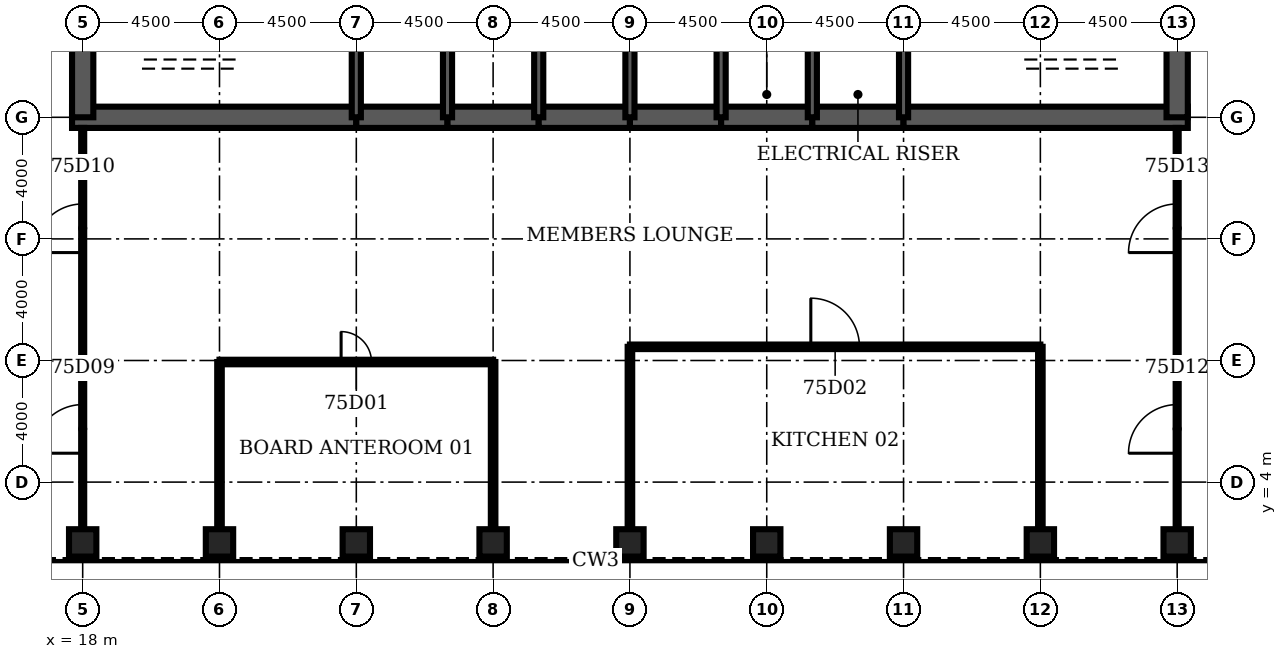
"""IFC4 building model, lengths in metres.
Left out: names, types, materials, properties, quantities, classifications, styles, units other than length and angle.
Written with IfcOpenShell. Run it as: python <this file> out.ifc"""

import sys

from ifc_helpers import new_model, si_unit, direction, frame, frame_2d, origin, origin_2d, place, context, subcontext, project, spatial, rectangle, hollow_rectangle, extrude, element, fill, save


model = new_model("IFC4")
c1 = context("Model", 3, precision=1e-05, world=origin(), true_north=direction((0.0, 1.0)))
c2 = subcontext(c1, "Body", "Model", "MODEL_VIEW")
j1 = project(units=[si_unit("LENGTHUNIT", "METRE"), si_unit("PLANEANGLEUNIT", "RADIAN")], contexts=[c1])
p1 = place(None, origin())
s1 = spatial("IfcSite", under=j1, at=p1, CompositionType="ELEMENT")
p2 = place(p1, origin())
s2 = spatial("IfcBuilding", under=s1, at=p2, CompositionType="ELEMENT")
p3 = place(p2, frame((0.0, 0.0, 329.9)))
s3 = spatial("IfcBuildingStorey", under=s2, at=p3, CompositionType="ELEMENT", Elevation=329.9)
for number, where, z_axis, x_axis in (
    (1, (18.0, 2.0, 0.0), (0.0, 0.0, 1.0), (0.0, 1.0, 0.0)),
    (2, (22.5, 2.0, 0.0), (0.0, 0.0, 1.0), (0.0, 1.0, 0.0)),
    (3, (27.0, 2.0, 0.0), (0.0, 0.0, 1.0), (0.0, 1.0, 0.0)),
    (4, (31.5, 2.0, 0.0), (0.0, 0.0, 1.0), (0.0, 1.0, 0.0)),
    (5, (36.0, 2.0, 0.0), (0.0, 0.0, 1.0), (0.0, 1.0, 0.0)),
    (6, (40.5, 2.0, 0.0), (0.0, 0.0, 1.0), (0.0, 1.0, 0.0)),
    (7, (45.0, 2.0, 0.0), (0.0, 0.0, 1.0), (0.0, 1.0, 0.0)),
    (8, (49.5, 2.0, 0.0), (0.0, 0.0, 1.0), (0.0, 1.0, 0.0)),
    (9, (54.0, 2.0, 0.0), (0.0, 0.0, 1.0), (0.0, 1.0, 0.0)),
):
    element("IfcColumn", number, at=place(p3, frame(where, z_axis=z_axis, x_axis=x_axis)), inside=s3, PredefinedType="COLUMN", context=c2, shape_type="SweptSolid", body=[
        extrude(hollow_rectangle(XDim=0.9, YDim=0.9, WallThickness=0.05, at=origin_2d()), origin(), (0.0, 0.0, 1.0), 4.2),
    ])
p4 = place(p3, frame((17.65, 16.0, 0.0), z_axis=(0.0, 0.0, 1.0), x_axis=(1.0, 0.0, 0.0)))
e10 = element("IfcWall", 10, at=p4, inside=s3, PredefinedType="SHEAR", context=c2, shape_type="SweptSolid", body=[
    extrude(rectangle(XDim=9.35, YDim=0.7, at=frame_2d((4.675, 0.0))), origin(), (0.0, 0.0, 1.0), 4.2),
])
for number, where, z_axis, x_axis in (
    (11, (27.0, 16.0, 0.0), (0.0, 0.0, 1.0), (1.0, 0.0, 0.0)),
    (12, (30.0, 16.0, 0.0), (0.0, 0.0, 1.0), (1.0, 0.0, 0.0)),
    (13, (33.0, 16.0, 0.0), (0.0, 0.0, 1.0), (1.0, 0.0, 0.0)),
    (14, (36.0, 16.0, 0.0), (0.0, 0.0, 1.0), (1.0, 0.0, 0.0)),
    (15, (39.0, 16.0, 0.0), (0.0, 0.0, 1.0), (1.0, 0.0, 0.0)),
    (16, (42.0, 16.0, 0.0), (0.0, 0.0, 1.0), (1.0, 0.0, 0.0)),
):
    element("IfcWall", number, at=place(p3, frame(where, z_axis=z_axis, x_axis=x_axis)), inside=s3, PredefinedType="SHEAR", context=c2, shape_type="SweptSolid", body=[
        extrude(rectangle(XDim=3.0, YDim=0.7, at=frame_2d((1.5, 0.0))), origin(), (0.0, 0.0, 1.0), 4.2),
    ])
p5 = place(p3, frame((45.0, 16.0, 0.0), z_axis=(0.0, 0.0, 1.0), x_axis=(1.0, 0.0, 0.0)))
e17 = element("IfcWall", 17, at=p5, inside=s3, PredefinedType="SHEAR", context=c2, shape_type="SweptSolid", body=[
    extrude(rectangle(XDim=9.35, YDim=0.7, at=frame_2d((4.675, 0.0))), origin(), (0.0, 0.0, 1.0), 4.2),
])
for number, where, z_axis, x_axis in (
    (18, (18.0, 19.2, 0.0), (0.0, 0.0, 1.0), (0.0, -1.0, 0.0)),
    (19, (54.0, 16.0, 0.0), (0.0, 0.0, 1.0), (0.0, 1.0, 0.0)),
):
    element("IfcWall", number, at=place(p3, frame(where, z_axis=z_axis, x_axis=x_axis)), inside=s3, PredefinedType="SHEAR", context=c2, shape_type="SweptSolid", body=[
        extrude(rectangle(XDim=3.2, YDim=0.7, at=frame_2d((1.6, 0.0))), origin(), (0.0, 0.0, 1.0), 4.2),
    ])
for number, where, z_axis, x_axis in (
    (20, (27.0, 16.0, 0.0), (0.0, 0.0, 1.0), (0.0, 1.0, 0.0)),
    (21, (30.0, 16.0, 0.0), (0.0, 0.0, 1.0), (0.0, 1.0, 0.0)),
    (22, (33.0, 16.0, 0.0), (0.0, 0.0, 1.0), (0.0, 1.0, 0.0)),
    (23, (36.0, 16.0, 0.0), (0.0, 0.0, 1.0), (0.0, 1.0, 0.0)),
    (24, (39.0, 16.0, 0.0), (0.0, 0.0, 1.0), (0.0, 1.0, 0.0)),
    (25, (42.0, 16.0, 0.0), (0.0, 0.0, 1.0), (0.0, 1.0, 0.0)),
    (26, (45.0, 16.0, 0.0), (0.0, 0.0, 1.0), (0.0, 1.0, 0.0)),
):
    element("IfcWall", number, at=place(p3, frame(where, z_axis=z_axis, x_axis=x_axis)), inside=s3, PredefinedType="SOLIDWALL", context=c2, shape_type="SweptSolid", body=[
        extrude(rectangle(XDim=3.2, YDim=0.3, at=frame_2d((1.6, 0.0))), origin(), (0.0, 0.0, 1.0), 4.2),
    ])
p6 = place(p3, frame((39.15, 17.3, 0.0), z_axis=(0.0, 0.0, 1.0), x_axis=(1.0, 0.0, 0.0)))
e27 = element("IfcWall", 27, at=p6, inside=s3, PredefinedType="SOLIDWALL", context=c2, shape_type="SweptSolid", body=[
    extrude(rectangle(XDim=2.7, YDim=0.3, at=frame_2d((1.35, 0.0))), origin(), (0.0, 0.0, 1.0), 3.95),
])
p7 = place(p6, frame((0.85, 0.0, 0.0)))
e28 = element("IfcOpeningElement", 28, at=p7, cuts=e27, PredefinedType="OPENING", context=c2, shape_type="SweptSolid", body=[
    extrude(rectangle(XDim=1.0, YDim=2.1, at=frame_2d((0.5, 1.05))), frame((0.0, 0.16, 0.0), z_axis=(0.0, -1.0, 0.0), x_axis=(1.0, 0.0, 0.0)), (0.0, 0.0, 1.0), 0.32),
])
p8 = place(p3, frame((42.15, 17.3, 0.0), z_axis=(0.0, 0.0, 1.0), x_axis=(1.0, 0.0, 0.0)))
e29 = element("IfcWall", 29, at=p8, inside=s3, PredefinedType="SOLIDWALL", context=c2, shape_type="SweptSolid", body=[
    extrude(rectangle(XDim=2.7, YDim=0.3, at=frame_2d((1.35, 0.0))), origin(), (0.0, 0.0, 1.0), 3.95),
])
p9 = place(p8, frame((0.85, 0.0, 0.0)))
e30 = element("IfcOpeningElement", 30, at=p9, cuts=e29, PredefinedType="OPENING", context=c2, shape_type="SweptSolid", body=[
    extrude(rectangle(XDim=1.0, YDim=2.1, at=frame_2d((0.5, 1.05))), frame((0.0, 0.16, 0.0), z_axis=(0.0, -1.0, 0.0), x_axis=(1.0, 0.0, 0.0)), (0.0, 0.0, 1.0), 0.32),
])
p10 = place(p3, frame((22.5, 7.95, 0.0), z_axis=(0.0, 0.0, 1.0), x_axis=(1.0, 0.0, 0.0)))
e31 = element("IfcWall", 31, at=p10, inside=s3, PredefinedType="PARTITIONING", context=c2, shape_type="SweptSolid", body=[
    extrude(rectangle(XDim=9.0, YDim=0.15, at=frame_2d((4.5, 0.0))), origin(), (0.0, 0.0, 1.0), 3.0),
])
p11 = place(p10, frame((4.0, 0.0, 0.0)))
e32 = element("IfcOpeningElement", 32, at=p11, cuts=e31, PredefinedType="OPENING", context=c2, shape_type="SweptSolid", body=[
    extrude(rectangle(XDim=1.0, YDim=2.1, at=frame_2d((0.5, 1.05))), frame((0.0, 0.085, 0.0), z_axis=(0.0, -1.0, 0.0), x_axis=(1.0, 0.0, 0.0)), (0.0, 0.0, 1.0), 0.17),
])
p12 = place(p3, frame((36.0, 8.45, 0.0), z_axis=(0.0, 0.0, 1.0), x_axis=(1.0, 0.0, 0.0)))
e33 = element("IfcWall", 33, at=p12, inside=s3, PredefinedType="PARTITIONING", context=c2, shape_type="SweptSolid", body=[
    extrude(rectangle(XDim=13.5, YDim=0.15, at=frame_2d((6.75, 0.0))), origin(), (0.0, 0.0, 1.0), 3.0),
])
p13 = place(p12, frame((5.95, 0.0, 0.0)))
e34 = element("IfcOpeningElement", 34, at=p13, cuts=e33, PredefinedType="OPENING", context=c2, shape_type="SweptSolid", body=[
    extrude(rectangle(XDim=1.6, YDim=2.1, at=frame_2d((0.8, 1.05))), frame((0.0, 0.085, 0.0), z_axis=(0.0, -1.0, 0.0), x_axis=(1.0, 0.0, 0.0)), (0.0, 0.0, 1.0), 0.17),
])
p14 = place(p3, frame((18.0, 2.45, 0.0), z_axis=(0.0, 0.0, 1.0), x_axis=(0.0, 1.0, 0.0)))
e35 = element("IfcWall", 35, at=p14, inside=s3, PredefinedType="PARTITIONING", context=c2, shape_type="SweptSolid", body=[
    extrude(rectangle(XDim=13.2, YDim=0.1, at=frame_2d((6.6, 0.0))), origin(), (0.0, 0.0, 1.0), 3.0),
])
p15 = place(p14, frame((2.5, 0.0, 0.0)))
e36 = element("IfcOpeningElement", 36, at=p15, cuts=e35, PredefinedType="OPENING", context=c2, shape_type="SweptSolid", body=[
    extrude(rectangle(XDim=1.6, YDim=2.1, at=frame_2d((0.8, 1.05))), frame((0.0, 0.06, 0.0), z_axis=(0.0, -1.0, 0.0), x_axis=(1.0, 0.0, 0.0)), (0.0, 0.0, 1.0), 0.12),
])
p16 = place(p14, frame((9.1, 0.0, 0.0)))
e37 = element("IfcOpeningElement", 37, at=p16, cuts=e35, PredefinedType="OPENING", context=c2, shape_type="SweptSolid", body=[
    extrude(rectangle(XDim=1.6, YDim=2.1, at=frame_2d((0.8, 1.05))), frame((0.0, 0.06, 0.0), z_axis=(0.0, -1.0, 0.0), x_axis=(1.0, 0.0, 0.0)), (0.0, 0.0, 1.0), 0.12),
])
for number, where, z_axis, x_axis in (
    (38, (22.5, 2.45, 0.0), (0.0, 0.0, 1.0), (0.0, 1.0, 0.0)),
    (39, (31.5, 2.45, 0.0), (0.0, 0.0, 1.0), (0.0, 1.0, 0.0)),
):
    element("IfcWall", number, at=place(p3, frame(where, z_axis=z_axis, x_axis=x_axis)), inside=s3, PredefinedType="PARTITIONING", context=c2, shape_type="SweptSolid", body=[
        extrude(rectangle(XDim=5.5, YDim=0.15, at=frame_2d((2.75, 0.0))), origin(), (0.0, 0.0, 1.0), 3.0),
    ])
for number, where, z_axis, x_axis in (
    (40, (36.0, 2.45, 0.0), (0.0, 0.0, 1.0), (0.0, 1.0, 0.0)),
    (41, (49.5, 2.45, 0.0), (0.0, 0.0, 1.0), (0.0, 1.0, 0.0)),
):
    element("IfcWall", number, at=place(p3, frame(where, z_axis=z_axis, x_axis=x_axis)), inside=s3, PredefinedType="PARTITIONING", context=c2, shape_type="SweptSolid", body=[
        extrude(rectangle(XDim=6.0, YDim=0.15, at=frame_2d((3.0, 0.0))), origin(), (0.0, 0.0, 1.0), 3.0),
    ])
p17 = place(p3, frame((54.0, 2.45, 0.0), z_axis=(0.0, 0.0, 1.0), x_axis=(0.0, 1.0, 0.0)))
e42 = element("IfcWall", 42, at=p17, inside=s3, PredefinedType="PARTITIONING", context=c2, shape_type="SweptSolid", body=[
    extrude(rectangle(XDim=13.2, YDim=0.1, at=frame_2d((6.6, 0.0))), origin(), (0.0, 0.0, 1.0), 3.0),
])
p18 = place(p17, frame((2.5, 0.0, 0.0)))
e43 = element("IfcOpeningElement", 43, at=p18, cuts=e42, PredefinedType="OPENING", context=c2, shape_type="SweptSolid", body=[
    extrude(rectangle(XDim=1.6, YDim=2.1, at=frame_2d((0.8, 1.05))), frame((0.0, 0.06, 0.0), z_axis=(0.0, -1.0, 0.0), x_axis=(1.0, 0.0, 0.0)), (0.0, 0.0, 1.0), 0.12),
])
p19 = place(p17, frame((9.1, 0.0, 0.0)))
e44 = element("IfcOpeningElement", 44, at=p19, cuts=e42, PredefinedType="OPENING", context=c2, shape_type="SweptSolid", body=[
    extrude(rectangle(XDim=1.6, YDim=2.1, at=frame_2d((0.8, 1.05))), frame((0.0, 0.06, 0.0), z_axis=(0.0, -1.0, 0.0), x_axis=(1.0, 0.0, 0.0)), (0.0, 0.0, 1.0), 0.12),
])
p20 = place(p7, origin())
e45 = element("IfcDoor", 45, at=p20, inside=s3, OperationType="SINGLE_SWING_LEFT", PredefinedType="DOOR", context=c2, shape_type="SweptSolid", body=[
    extrude(rectangle(XDim=1.0, YDim=2.1, at=frame_2d((0.5, 1.05))), frame((0.0, 0.025, 0.0), z_axis=(0.0, -1.0, 0.0), x_axis=(1.0, 0.0, 0.0)), (0.0, 0.0, 1.0), 0.05),
])
fill(e28, e45)
p21 = place(p9, origin())
e46 = element("IfcDoor", 46, at=p21, inside=s3, OperationType="SINGLE_SWING_LEFT", PredefinedType="DOOR", context=c2, shape_type="SweptSolid", body=[
    extrude(rectangle(XDim=1.0, YDim=2.1, at=frame_2d((0.5, 1.05))), frame((0.0, 0.025, 0.0), z_axis=(0.0, -1.0, 0.0), x_axis=(1.0, 0.0, 0.0)), (0.0, 0.0, 1.0), 0.05),
])
fill(e30, e46)
p22 = place(p11, origin())
e47 = element("IfcDoor", 47, at=p22, inside=s3, OperationType="SINGLE_SWING_LEFT", PredefinedType="DOOR", context=c2, shape_type="SweptSolid", body=[
    extrude(rectangle(XDim=1.0, YDim=2.1, at=frame_2d((0.5, 1.05))), frame((0.0, 0.025, 0.0), z_axis=(0.0, -1.0, 0.0), x_axis=(1.0, 0.0, 0.0)), (0.0, 0.0, 1.0), 0.05),
])
fill(e32, e47)
p23 = place(p13, origin())
e48 = element("IfcDoor", 48, at=p23, inside=s3, OperationType="SINGLE_SWING_LEFT", PredefinedType="DOOR", context=c2, shape_type="SweptSolid", body=[
    extrude(rectangle(XDim=1.6, YDim=2.1, at=frame_2d((0.8, 1.05))), frame((0.0, 0.025, 0.0), z_axis=(0.0, -1.0, 0.0), x_axis=(1.0, 0.0, 0.0)), (0.0, 0.0, 1.0), 0.05),
])
fill(e34, e48)
p24 = place(p15, origin())
e49 = element("IfcDoor", 49, at=p24, inside=s3, OperationType="SINGLE_SWING_LEFT", PredefinedType="DOOR", context=c2, shape_type="SweptSolid", body=[
    extrude(rectangle(XDim=1.6, YDim=2.1, at=frame_2d((0.8, 1.05))), frame((0.0, 0.025, 0.0), z_axis=(0.0, -1.0, 0.0), x_axis=(1.0, 0.0, 0.0)), (0.0, 0.0, 1.0), 0.05),
])
fill(e36, e49)
p25 = place(p16, origin())
e50 = element("IfcDoor", 50, at=p25, inside=s3, OperationType="SINGLE_SWING_LEFT", PredefinedType="DOOR", context=c2, shape_type="SweptSolid", body=[
    extrude(rectangle(XDim=1.6, YDim=2.1, at=frame_2d((0.8, 1.05))), frame((0.0, 0.025, 0.0), z_axis=(0.0, -1.0, 0.0), x_axis=(1.0, 0.0, 0.0)), (0.0, 0.0, 1.0), 0.05),
])
fill(e37, e50)
p26 = place(p18, origin())
e51 = element("IfcDoor", 51, at=p26, inside=s3, OperationType="SINGLE_SWING_LEFT", PredefinedType="DOOR", context=c2, shape_type="SweptSolid", body=[
    extrude(rectangle(XDim=1.6, YDim=2.1, at=frame_2d((0.8, 1.05))), frame((0.0, 0.025, 0.0), z_axis=(0.0, -1.0, 0.0), x_axis=(1.0, 0.0, 0.0)), (0.0, 0.0, 1.0), 0.05),
])
fill(e43, e51)
p27 = place(p19, origin())
e52 = element("IfcDoor", 52, at=p27, inside=s3, OperationType="SINGLE_SWING_LEFT", PredefinedType="DOOR", context=c2, shape_type="SweptSolid", body=[
    extrude(rectangle(XDim=1.6, YDim=2.1, at=frame_2d((0.8, 1.05))), frame((0.0, 0.025, 0.0), z_axis=(0.0, -1.0, 0.0), x_axis=(1.0, 0.0, 0.0)), (0.0, 0.0, 1.0), 0.05),
])
fill(e44, e52)
save(model, sys.argv[1])
